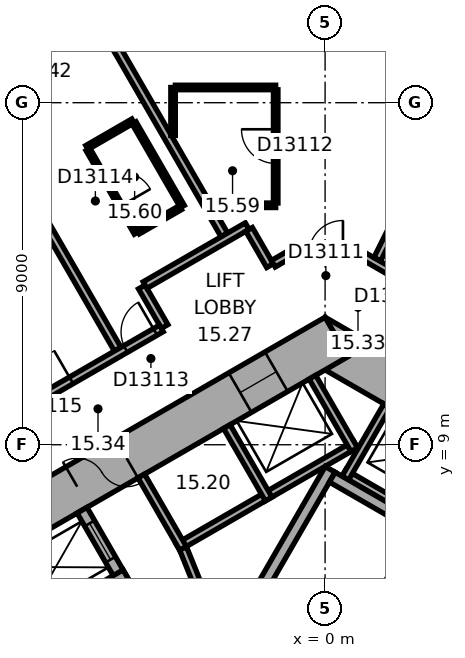
"""IFC4 building model, lengths in metres.
Left out: names, types, materials, properties, quantities, classifications, styles, units other than length and angle.
Written with IfcOpenShell. Run it as: python <this file> out.ifc"""

import sys

from ifc_helpers import new_model, si_unit, direction, frame, frame_2d, origin, place, context, subcontext, project, spatial, rectangle, extrude, element, fill, save


model = new_model("IFC4")
c1 = context("Model", 3, precision=1e-05, world=origin(), true_north=direction((0.0, 1.0)))
c2 = subcontext(c1, "Body", "Model", "MODEL_VIEW")
j1 = project(units=[si_unit("LENGTHUNIT", "METRE"), si_unit("PLANEANGLEUNIT", "RADIAN")], contexts=[c1])
p1 = place(None, origin())
s1 = spatial("IfcSite", under=j1, at=p1, CompositionType="ELEMENT")
p2 = place(p1, origin())
s2 = spatial("IfcBuilding", under=s1, at=p2, CompositionType="ELEMENT")
p3 = place(p2, frame((0.0, 0.0, 70.4)))
s3 = spatial("IfcBuildingStorey", under=s2, at=p3, CompositionType="ELEMENT", Elevation=70.4)
p4 = place(p3, frame((10.4, 5.658, 0.0), z_axis=(0.0, 0.0, 1.0), x_axis=(-0.866021384402, 0.500006961711, 0.0)))
e1 = element("IfcWall", 1, at=p4, inside=s3, PredefinedType="SHEAR", context=c2, shape_type="SweptSolid", body=[
    extrude(rectangle(XDim=12.355, YDim=1.2, at=frame_2d((6.178, 0.0))), origin(), (0.0, 0.0, 1.0), 3.3),
])
p5 = place(p4, frame((2.728, 0.0, 0.0)))
e2 = element("IfcOpeningElement", 2, at=p5, cuts=e1, PredefinedType="OPENING", context=c2, shape_type="SweptSolid", body=[
    extrude(rectangle(XDim=1.1, YDim=2.1, at=frame_2d((0.55, 1.05))), frame((0.0, 0.61, 0.0), z_axis=(0.0, -1.0, 0.0), x_axis=(1.0, 0.0, 0.0)), (0.0, 0.0, 1.0), 1.22),
])
p6 = place(p4, frame((5.328, 0.0, 0.0)))
e3 = element("IfcOpeningElement", 3, at=p6, cuts=e1, PredefinedType="OPENING", context=c2, shape_type="SweptSolid", body=[
    extrude(rectangle(XDim=1.1, YDim=2.1, at=frame_2d((0.55, 1.05))), frame((0.0, 0.61, 0.0), z_axis=(0.0, -1.0, 0.0), x_axis=(1.0, 0.0, 0.0)), (0.0, 0.0, 1.0), 1.22),
])
p7 = place(p4, frame((7.928, 0.0, 0.0)))
e4 = element("IfcOpeningElement", 4, at=p7, cuts=e1, PredefinedType="OPENING", context=c2, shape_type="SweptSolid", body=[
    extrude(rectangle(XDim=1.1, YDim=2.1, at=frame_2d((0.55, 1.05))), frame((0.0, 0.61, 0.0), z_axis=(0.0, -1.0, 0.0), x_axis=(1.0, 0.0, 0.0)), (0.0, 0.0, 1.0), 1.22),
])
p8 = place(p3, frame((0.3, 11.836, 0.0), z_axis=(0.0, 0.0, 1.0), x_axis=(-0.866021384402, -0.500006961711, 0.0)))
e5 = element("IfcWall", 5, at=p8, inside=s3, PredefinedType="SHEAR", context=c2, shape_type="SweptSolid", body=[
    extrude(rectangle(XDim=12.355, YDim=1.2, at=frame_2d((6.178, 0.0))), origin(), (0.0, 0.0, 1.0), 3.3),
])
p9 = place(p8, frame((6.378, 0.0, 0.0)))
e6 = element("IfcOpeningElement", 6, at=p9, cuts=e5, PredefinedType="OPENING", context=c2, shape_type="SweptSolid", body=[
    extrude(rectangle(XDim=1.5, YDim=2.1, at=frame_2d((0.75, 1.05))), frame((0.0, 0.61, 0.0), z_axis=(0.0, -1.0, 0.0), x_axis=(1.0, 0.0, 0.0)), (0.0, 0.0, 1.0), 1.22),
])
p10 = place(p8, frame((1.828, 0.0, 0.0)))
e7 = element("IfcOpeningElement", 7, at=p10, cuts=e5, PredefinedType="OPENING", context=c2, shape_type="SweptSolid", body=[
    extrude(rectangle(XDim=1.1, YDim=2.1, at=frame_2d((0.55, 1.05))), frame((0.0, 0.61, 0.0), z_axis=(0.0, -1.0, 0.0), x_axis=(1.0, 0.0, 0.0)), (0.0, 0.0, 1.0), 1.22),
])
p11 = place(p3, frame((20.63, 15.47, 0.0), z_axis=(0.0, 0.0, 1.0), x_axis=(-0.894934518609, 0.446197498203, 0.0)))
e8 = element("IfcWall", 8, at=p11, inside=s3, PredefinedType="STANDARD", context=c2, shape_type="SweptSolid", body=[
    extrude(rectangle(XDim=21.246, YDim=0.2, at=frame_2d((10.623, 0.0))), origin(), (0.0, 0.0, 1.0), 3.3),
])
p12 = place(p11, frame((1.553, 0.0, 0.8)))
e9 = element("IfcOpeningElement", 9, at=p12, cuts=e8, PredefinedType="OPENING", context=c2, shape_type="SweptSolid", body=[
    extrude(rectangle(XDim=2.4, YDim=1.7, at=frame_2d((1.2, 0.85))), frame((0.0, 0.11, 0.0), z_axis=(0.0, -1.0, 0.0), x_axis=(1.0, 0.0, 0.0)), (0.0, 0.0, 1.0), 0.22),
])
p13 = place(p11, frame((5.488, 0.0, 0.8)))
e10 = element("IfcOpeningElement", 10, at=p13, cuts=e8, PredefinedType="OPENING", context=c2, shape_type="SweptSolid", body=[
    extrude(rectangle(XDim=2.4, YDim=1.7, at=frame_2d((1.2, 0.85))), frame((0.0, 0.11, 0.0), z_axis=(0.0, -1.0, 0.0), x_axis=(1.0, 0.0, 0.0)), (0.0, 0.0, 1.0), 0.22),
])
p14 = place(p11, frame((9.422, 0.0, 0.8)))
e11 = element("IfcOpeningElement", 11, at=p14, cuts=e8, PredefinedType="OPENING", context=c2, shape_type="SweptSolid", body=[
    extrude(rectangle(XDim=2.4, YDim=1.7, at=frame_2d((1.2, 0.85))), frame((0.0, 0.11, 0.0), z_axis=(0.0, -1.0, 0.0), x_axis=(1.0, 0.0, 0.0)), (0.0, 0.0, 1.0), 0.22),
])
p15 = place(p11, frame((13.357, 0.0, 0.8)))
e12 = element("IfcOpeningElement", 12, at=p15, cuts=e8, PredefinedType="OPENING", context=c2, shape_type="SweptSolid", body=[
    extrude(rectangle(XDim=2.4, YDim=1.7, at=frame_2d((1.2, 0.85))), frame((0.0, 0.11, 0.0), z_axis=(0.0, -1.0, 0.0), x_axis=(1.0, 0.0, 0.0)), (0.0, 0.0, 1.0), 0.22),
])
p16 = place(p11, frame((17.292, 0.0, 0.8)))
e13 = element("IfcOpeningElement", 13, at=p16, cuts=e8, PredefinedType="OPENING", context=c2, shape_type="SweptSolid", body=[
    extrude(rectangle(XDim=2.4, YDim=1.7, at=frame_2d((1.2, 0.85))), frame((0.0, 0.11, 0.0), z_axis=(0.0, -1.0, 0.0), x_axis=(1.0, 0.0, 0.0)), (0.0, 0.0, 1.0), 0.22),
])
p17 = place(p3, frame((-3.136, 24.805, 0.0), z_axis=(0.0, 0.0, 1.0), x_axis=(-0.866028291626, -0.499994998079, 0.0)))
e14 = element("IfcWall", 14, at=p17, inside=s3, PredefinedType="STANDARD", context=c2, shape_type="SweptSolid", body=[
    extrude(rectangle(XDim=21.246, YDim=0.2, at=frame_2d((10.623, 0.0))), origin(), (0.0, 0.0, 1.0), 3.3),
])
p18 = place(p17, frame((1.555, 0.0, 0.8)))
e15 = element("IfcOpeningElement", 15, at=p18, cuts=e14, PredefinedType="OPENING", context=c2, shape_type="SweptSolid", body=[
    extrude(rectangle(XDim=2.4, YDim=1.7, at=frame_2d((1.2, 0.85))), frame((0.0, 0.11, 0.0), z_axis=(0.0, -1.0, 0.0), x_axis=(1.0, 0.0, 0.0)), (0.0, 0.0, 1.0), 0.22),
])
p19 = place(p17, frame((5.489, 0.0, 0.8)))
e16 = element("IfcOpeningElement", 16, at=p19, cuts=e14, PredefinedType="OPENING", context=c2, shape_type="SweptSolid", body=[
    extrude(rectangle(XDim=2.4, YDim=1.7, at=frame_2d((1.2, 0.85))), frame((0.0, 0.11, 0.0), z_axis=(0.0, -1.0, 0.0), x_axis=(1.0, 0.0, 0.0)), (0.0, 0.0, 1.0), 0.22),
])
p20 = place(p17, frame((9.424, 0.0, 0.8)))
e17 = element("IfcOpeningElement", 17, at=p20, cuts=e14, PredefinedType="OPENING", context=c2, shape_type="SweptSolid", body=[
    extrude(rectangle(XDim=2.4, YDim=1.7, at=frame_2d((1.2, 0.85))), frame((0.0, 0.11, 0.0), z_axis=(0.0, -1.0, 0.0), x_axis=(1.0, 0.0, 0.0)), (0.0, 0.0, 1.0), 0.22),
])
p21 = place(p17, frame((13.358, 0.0, 0.8)))
e18 = element("IfcOpeningElement", 18, at=p21, cuts=e14, PredefinedType="OPENING", context=c2, shape_type="SweptSolid", body=[
    extrude(rectangle(XDim=2.4, YDim=1.7, at=frame_2d((1.2, 0.85))), frame((0.0, 0.11, 0.0), z_axis=(0.0, -1.0, 0.0), x_axis=(1.0, 0.0, 0.0)), (0.0, 0.0, 1.0), 0.22),
])
p22 = place(p17, frame((17.293, 0.0, 0.8)))
e19 = element("IfcOpeningElement", 19, at=p22, cuts=e14, PredefinedType="OPENING", context=c2, shape_type="SweptSolid", body=[
    extrude(rectangle(XDim=2.4, YDim=1.7, at=frame_2d((1.2, 0.85))), frame((0.0, 0.11, 0.0), z_axis=(0.0, -1.0, 0.0), x_axis=(1.0, 0.0, 0.0)), (0.0, 0.0, 1.0), 0.22),
])
p23 = place(p3, frame((7.424, 4.259, 0.0), z_axis=(0.0, 0.0, 1.0), x_axis=(-0.866026010844, 0.49999894854, 0.0)))
e20 = element("IfcWall", 20, at=p23, inside=s3, PredefinedType="PARTITIONING", context=c2, shape_type="SweptSolid", body=[
    extrude(rectangle(XDim=8.0, YDim=0.2, at=frame_2d((4.0, 0.0))), origin(), (0.0, 0.0, 1.0), 3.05),
])
p24 = place(p3, frame((0.532, 8.122, 0.0), z_axis=(0.0, 0.0, 1.0), x_axis=(0.500077893725, 0.86598042715, 0.0)))
e21 = element("IfcWall", 21, at=p24, inside=s3, PredefinedType="PARTITIONING", context=c2, shape_type="SweptSolid", body=[
    extrude(rectangle(XDim=2.2, YDim=0.2, at=frame_2d((1.1, 0.0))), origin(), (0.0, 0.0, 1.0), 3.05),
])
p25 = place(p3, frame((0.803, 9.009, 0.0), z_axis=(0.0, 0.0, 1.0), x_axis=(-0.866028230842, -0.499995103361, 0.0)))
e22 = element("IfcWall", 22, at=p25, inside=s3, PredefinedType="PARTITIONING", context=c2, shape_type="SweptSolid", body=[
    extrude(rectangle(XDim=5.4, YDim=0.2, at=frame_2d((2.7, 0.0))), origin(), (0.0, 0.0, 1.0), 3.05),
])
p26 = place(p3, frame((0.767, 8.872, 0.0), z_axis=(0.0, 0.0, 1.0), x_axis=(-0.499994660107, 0.866028486751, 0.0)))
e23 = element("IfcWall", 23, at=p26, inside=s3, PredefinedType="PARTITIONING", context=c2, shape_type="SweptSolid", body=[
    extrude(rectangle(XDim=2.2, YDim=0.2, at=frame_2d((1.1, 0.0))), origin(), (0.0, 0.0, 1.0), 3.05),
])
for number, where, z_axis, x_axis in (
    (24, (-1.485, 7.572, 0.0), (0.0, 0.0, 1.0), (-0.5, 0.866, 0.0)),
    (25, (-3.737, 6.272, 0.0), (0.0, 0.0, 1.0), (-0.5, 0.866, 0.0)),
):
    element("IfcWall", number, at=place(p3, frame(where, z_axis=z_axis, x_axis=x_axis)), inside=s3, PredefinedType="PARTITIONING", context=c2, shape_type="SweptSolid", body=[
        extrude(rectangle(XDim=2.2, YDim=0.2, at=frame_2d((1.1, 0.0))), origin(), (0.0, 0.0, 1.0), 3.05),
    ])
p27 = place(p3, frame((-2.216, 4.282, 0.0), z_axis=(0.0, 0.0, 1.0), x_axis=(0.499977259774, 0.866038532462, 0.0)))
e26 = element("IfcWall", 26, at=p27, inside=s3, PredefinedType="SHEAR", context=c2, shape_type="SweptSolid", body=[
    extrude(rectangle(XDim=4.7, YDim=0.3, at=frame_2d((2.35, 0.0))), origin(), (0.0, 0.0, 1.0), 3.05),
])
p28 = place(p3, frame((6.303, 4.617, 0.0), z_axis=(0.0, 0.0, 1.0), x_axis=(-0.866027801685, 0.499995846692, 0.0)))
e27 = element("IfcWall", 27, at=p28, inside=s3, PredefinedType="SHEAR", context=c2, shape_type="SweptSolid", body=[
    extrude(rectangle(XDim=7.06, YDim=0.3, at=frame_2d((3.53, 0.0))), origin(), (0.0, 0.0, 1.0), 3.05),
])
p29 = place(p3, frame((-5.295, 5.372, 0.0), z_axis=(0.0, 0.0, 1.0), x_axis=(-0.500077893725, 0.86598042715, 0.0)))
e28 = element("IfcWall", 28, at=p29, inside=s3, PredefinedType="SHEAR", context=c2, shape_type="SweptSolid", body=[
    extrude(rectangle(XDim=2.2, YDim=0.3, at=frame_2d((1.1, 0.0))), origin(), (0.0, 0.0, 1.0), 3.05),
])
p30 = place(p29, frame((0.7, 0.0, 0.0)))
e29 = element("IfcOpeningElement", 29, at=p30, cuts=e28, PredefinedType="OPENING", context=c2, shape_type="SweptSolid", body=[
    extrude(rectangle(XDim=1.1, YDim=2.1, at=frame_2d((0.55, 1.05))), frame((0.0, 0.16, 0.0), z_axis=(0.0, -1.0, 0.0), x_axis=(1.0, 0.0, 0.0)), (0.0, 0.0, 1.0), 0.32),
])
p31 = place(p3, frame((-5.24, 5.577, 0.0), z_axis=(0.0, 0.0, 1.0), x_axis=(-0.866014461049, -0.500018952895, 0.0)))
e30 = element("IfcWall", 30, at=p31, inside=s3, PredefinedType="SHEAR", context=c2, shape_type="SweptSolid", body=[
    extrude(rectangle(XDim=3.35, YDim=0.3, at=frame_2d((1.675, 0.0))), origin(), (0.0, 0.0, 1.0), 3.05),
])
p32 = place(p3, frame((-2.615, 3.487, 0.0), z_axis=(0.0, 0.0, 1.0), x_axis=(-0.373576831041, 0.92759924068, 0.0)))
e31 = element("IfcWall", 31, at=p32, inside=s3, PredefinedType="PARTITIONING", context=c2, shape_type="SweptSolid", body=[
    extrude(rectangle(XDim=3.002, YDim=0.2, at=frame_2d((1.501, 0.0))), origin(), (0.0, 0.0, 1.0), 3.05),
])
p33 = place(p32, frame((1.15, 0.0, 0.0)))
e32 = element("IfcOpeningElement", 32, at=p33, cuts=e31, PredefinedType="OPENING", context=c2, shape_type="SweptSolid", body=[
    extrude(rectangle(XDim=0.9, YDim=2.1, at=frame_2d((0.45, 1.05))), frame((0.0, 0.11, 0.0), z_axis=(0.0, -1.0, 0.0), x_axis=(1.0, 0.0, 0.0)), (0.0, 0.0, 1.0), 0.22),
])
p34 = place(p3, frame((-10.083, 19.524, 0.0), z_axis=(0.0, 0.0, 1.0), x_axis=(0.499999662836, -0.866025598446, 0.0)))
e33 = element("IfcWall", 33, at=p34, inside=s3, PredefinedType="PARTITIONING", context=c2, shape_type="SweptSolid", body=[
    extrude(rectangle(XDim=9.25, YDim=0.2, at=frame_2d((4.625, 0.0))), origin(), (0.0, 0.0, 1.0), 2.6),
])
p35 = place(p3, frame((-6.676, 21.492, 0.0), z_axis=(0.0, 0.0, 1.0), x_axis=(0.500011263043, -0.866018900966, 0.0)))
e34 = element("IfcWall", 34, at=p35, inside=s3, PredefinedType="PARTITIONING", context=c2, shape_type="SweptSolid", body=[
    extrude(rectangle(XDim=8.049, YDim=0.2, at=frame_2d((4.024, 0.0))), origin(), (0.0, 0.0, 1.0), 3.05),
])
p36 = place(p3, frame((-6.268, 16.82, 0.0), z_axis=(0.0, 0.0, 1.0), x_axis=(0.866002662425, 0.500039387122, 0.0)))
e35 = element("IfcWall", 35, at=p36, inside=s3, PredefinedType="PARTITIONING", context=c2, shape_type="SweptSolid", body=[
    extrude(rectangle(XDim=1.4, YDim=0.12, at=frame_2d((0.7, 0.0))), origin(), (0.0, 0.0, 1.0), 3.05),
])
p37 = place(p3, frame((-5.026, 17.469, 0.0), z_axis=(0.0, 0.0, 1.0), x_axis=(0.500005339912, -0.866022320763, 0.0)))
e36 = element("IfcWall", 36, at=p37, inside=s3, PredefinedType="PARTITIONING", context=c2, shape_type="SweptSolid", body=[
    extrude(rectangle(XDim=2.54, YDim=0.12, at=frame_2d((1.27, 0.0))), origin(), (0.0, 0.0, 1.0), 3.05),
])
p38 = place(p3, frame((-4.968, 14.569, 0.0), z_axis=(0.0, 0.0, 1.0), x_axis=(-0.500046963369, 0.865998287773, 0.0)))
e37 = element("IfcWall", 37, at=p38, inside=s3, PredefinedType="PARTITIONING", context=c2, shape_type="SweptSolid", body=[
    extrude(rectangle(XDim=2.54, YDim=0.12, at=frame_2d((1.27, 0.0))), origin(), (0.0, 0.0, 1.0), 3.05),
])
p39 = place(p38, frame((0.82, 0.0, 0.0)))
e38 = element("IfcOpeningElement", 38, at=p39, cuts=e37, PredefinedType="OPENING", context=c2, shape_type="SweptSolid", body=[
    extrude(rectangle(XDim=0.9, YDim=2.1, at=frame_2d((0.45, 1.05))), frame((0.0, 0.07, 0.0), z_axis=(0.0, -1.0, 0.0), x_axis=(1.0, 0.0, 0.0)), (0.0, 0.0, 1.0), 0.14),
])
p40 = place(p3, frame((-4.823, 13.152, 0.0), z_axis=(0.0, 0.0, 1.0), x_axis=(0.499986357472, -0.866033280158, 0.0)))
e39 = element("IfcWall", 39, at=p40, inside=s3, PredefinedType="PARTITIONING", context=c2, shape_type="SweptSolid", body=[
    extrude(rectangle(XDim=1.201, YDim=0.2, at=frame_2d((0.601, 0.0))), origin(), (0.0, 0.0, 1.0), 3.05),
])
p41 = place(p3, frame((-4.309, 12.061, 0.0), z_axis=(0.0, 0.0, 1.0), x_axis=(-0.866020679205, -0.500008183122, 0.0)))
e40 = element("IfcWall", 40, at=p41, inside=s3, PredefinedType="PARTITIONING", context=c2, shape_type="SweptSolid", body=[
    extrude(rectangle(XDim=5.104, YDim=0.2, at=frame_2d((2.552, 0.0))), origin(), (0.0, 0.0, 1.0), 3.05),
])
p42 = place(p41, frame((0.185, 0.0, 0.0)))
e41 = element("IfcOpeningElement", 41, at=p42, cuts=e40, PredefinedType="OPENING", context=c2, shape_type="SweptSolid", body=[
    extrude(rectangle(XDim=0.9, YDim=2.1, at=frame_2d((0.45, 1.05))), frame((0.0, 0.11, 0.0), z_axis=(0.0, -1.0, 0.0), x_axis=(1.0, 0.0, 0.0)), (0.0, 0.0, 1.0), 0.22),
])
p43 = place(p41, frame((2.736, 0.0, 0.0)))
e42 = element("IfcOpeningElement", 42, at=p43, cuts=e40, PredefinedType="OPENING", context=c2, shape_type="SweptSolid", body=[
    extrude(rectangle(XDim=0.9, YDim=2.1, at=frame_2d((0.45, 1.05))), frame((0.0, 0.11, 0.0), z_axis=(0.0, -1.0, 0.0), x_axis=(1.0, 0.0, 0.0)), (0.0, 0.0, 1.0), 0.22),
])
p44 = place(p3, frame((-4.0, 17.137, 0.0), z_axis=(0.0, 0.0, 1.0), x_axis=(0.0, 1.0, 0.0)))
e43 = element("IfcWall", 43, at=p44, inside=s3, PredefinedType="PARTITIONING", context=c2, shape_type="SweptSolid", body=[
    extrude(rectangle(XDim=1.263, YDim=0.12, at=frame_2d((0.632, 0.0))), origin(), (0.0, 0.0, 1.0), 3.05),
])
p45 = place(p3, frame((-3.94, 18.401, 0.0), z_axis=(0.0, 0.0, 1.0), x_axis=(1.0, 0.0, 0.0)))
e44 = element("IfcWall", 44, at=p45, inside=s3, PredefinedType="PARTITIONING", context=c2, shape_type="SweptSolid", body=[
    extrude(rectangle(XDim=2.64, YDim=0.12, at=frame_2d((1.32, 0.0))), origin(), (0.0, 0.0, 1.0), 3.05),
])
p46 = place(p3, frame((-3.808, 15.239, 0.0), z_axis=(0.0, 0.0, 1.0), x_axis=(-0.866087136806, -0.499893060024, 0.0)))
e45 = element("IfcWall", 45, at=p46, inside=s3, PredefinedType="PARTITIONING", context=c2, shape_type="SweptSolid", body=[
    extrude(rectangle(XDim=1.28, YDim=0.12, at=frame_2d((0.64, 0.0))), origin(), (0.0, 0.0, 1.0), 3.05),
])
p47 = place(p3, frame((-2.05, 14.752, 0.0), z_axis=(0.0, 0.0, 1.0), x_axis=(-0.866030936828, -0.499990416364, 0.0)))
e46 = element("IfcWall", 46, at=p47, inside=s3, PredefinedType="PARTITIONING", context=c2, shape_type="SweptSolid", body=[
    extrude(rectangle(XDim=3.102, YDim=0.2, at=frame_2d((1.551, 0.0))), origin(), (0.0, 0.0, 1.0), 3.05),
])
p48 = place(p3, frame((-1.449, 13.712, 0.0), z_axis=(0.0, 0.0, 1.0), x_axis=(-0.499978356969, 0.866037899034, 0.0)))
e47 = element("IfcWall", 47, at=p48, inside=s3, PredefinedType="PARTITIONING", context=c2, shape_type="SweptSolid", body=[
    extrude(rectangle(XDim=1.101, YDim=0.2, at=frame_2d((0.551, 0.0))), origin(), (0.0, 0.0, 1.0), 3.05),
])
p49 = place(p3, frame((-1.3, 15.301, 0.0), z_axis=(0.0, 0.0, 1.0), x_axis=(-1.0, 0.0, 0.0)))
e48 = element("IfcWall", 48, at=p49, inside=s3, PredefinedType="PARTITIONING", context=c2, shape_type="SweptSolid", body=[
    extrude(rectangle(XDim=1.661, YDim=0.12, at=frame_2d((0.831, 0.0))), origin(), (0.0, 0.0, 1.0), 3.05),
])
p50 = place(p3, frame((-1.3, 18.341, 0.0), z_axis=(0.0, 0.0, 1.0), x_axis=(0.0, -1.0, 0.0)))
e49 = element("IfcWall", 49, at=p50, inside=s3, PredefinedType="PARTITIONING", context=c2, shape_type="SweptSolid", body=[
    extrude(rectangle(XDim=2.98, YDim=0.12, at=frame_2d((1.49, 0.0))), origin(), (0.0, 0.0, 1.0), 3.05),
])
p51 = place(p50, frame((1.04, 0.0, 0.0)))
e50 = element("IfcOpeningElement", 50, at=p51, cuts=e49, PredefinedType="OPENING", context=c2, shape_type="SweptSolid", body=[
    extrude(rectangle(XDim=0.9, YDim=2.1, at=frame_2d((0.45, 1.05))), frame((0.0, 0.07, 0.0), z_axis=(0.0, -1.0, 0.0), x_axis=(1.0, 0.0, 0.0)), (0.0, 0.0, 1.0), 0.14),
])
p52 = place(p3, frame((-0.95, 14.001, 0.0), z_axis=(0.0, 0.0, 1.0), x_axis=(-0.86609177584, -0.499885022602, 0.0)))
e51 = element("IfcWall", 51, at=p52, inside=s3, PredefinedType="PARTITIONING", context=c2, shape_type="SweptSolid", body=[
    extrude(rectangle(XDim=0.477, YDim=0.2, at=frame_2d((0.238, 0.0))), origin(), (0.0, 0.0, 1.0), 3.05),
])
p53 = place(p3, frame((0.95, 14.001, 0.0), z_axis=(0.0, 0.0, 1.0), x_axis=(-1.0, 0.0, 0.0)))
e52 = element("IfcWall", 52, at=p53, inside=s3, PredefinedType="PARTITIONING", context=c2, shape_type="SweptSolid", body=[
    extrude(rectangle(XDim=1.86, YDim=0.2, at=frame_2d((0.93, 0.0))), origin(), (0.0, 0.0, 1.0), 3.05),
])
p54 = place(p53, frame((0.48, 0.0, 0.0)))
e53 = element("IfcOpeningElement", 53, at=p54, cuts=e52, PredefinedType="OPENING", context=c2, shape_type="SweptSolid", body=[
    extrude(rectangle(XDim=0.9, YDim=2.1, at=frame_2d((0.45, 1.05))), frame((0.0, 0.11, 0.0), z_axis=(0.0, -1.0, 0.0), x_axis=(1.0, 0.0, 0.0)), (0.0, 0.0, 1.0), 0.22),
])
p55 = place(p3, frame((2.748, 12.962, 0.0), z_axis=(0.0, 0.0, 1.0), x_axis=(-0.866013897511, 0.50001992892, 0.0)))
e54 = element("IfcWall", 54, at=p55, inside=s3, PredefinedType="PARTITIONING", context=c2, shape_type="SweptSolid", body=[
    extrude(rectangle(XDim=2.037, YDim=0.2, at=frame_2d((1.018, 0.0))), origin(), (0.0, 0.0, 1.0), 3.05),
])
p56 = place(p55, frame((0.372, 0.0, 0.0)))
e55 = element("IfcOpeningElement", 55, at=p56, cuts=e54, PredefinedType="OPENING", context=c2, shape_type="SweptSolid", body=[
    extrude(rectangle(XDim=0.9, YDim=2.1, at=frame_2d((0.45, 1.05))), frame((0.0, 0.11, 0.0), z_axis=(0.0, -1.0, 0.0), x_axis=(1.0, 0.0, 0.0)), (0.0, 0.0, 1.0), 0.22),
])
p57 = place(p3, frame((5.351, 21.859, 0.0), z_axis=(0.0, 0.0, 1.0), x_axis=(-0.446205309328, -0.894930624086, 0.0)))
e56 = element("IfcWall", 56, at=p57, inside=s3, PredefinedType="PARTITIONING", context=c2, shape_type="SweptSolid", body=[
    extrude(rectangle(XDim=8.913, YDim=0.2, at=frame_2d((4.457, 0.0))), origin(), (0.0, 0.0, 1.0), 2.6),
])
p58 = place(p9, origin())
e57 = element("IfcDoor", 57, at=p58, inside=s3, OperationType="DOUBLE_DOOR_SINGLE_SWING", PredefinedType="DOOR", context=c2, shape_type="SweptSolid", body=[
    extrude(rectangle(XDim=1.5, YDim=2.1, at=frame_2d((0.75, 1.05))), frame((0.0, 0.025, 0.0), z_axis=(0.0, -1.0, 0.0), x_axis=(1.0, 0.0, 0.0)), (0.0, 0.0, 1.0), 0.05),
])
fill(e6, e57)
p59 = place(p30, origin())
e58 = element("IfcDoor", 58, at=p59, inside=s3, OperationType="DOUBLE_DOOR_SLIDING", PredefinedType="DOOR", context=c2, shape_type="SweptSolid", body=[
    extrude(rectangle(XDim=1.1, YDim=2.1, at=frame_2d((0.55, 1.05))), frame((0.0, 0.025, 0.0), z_axis=(0.0, -1.0, 0.0), x_axis=(1.0, 0.0, 0.0)), (0.0, 0.0, 1.0), 0.05),
])
fill(e29, e58)
p60 = place(p10, origin())
e59 = element("IfcDoor", 59, at=p60, inside=s3, OperationType="DOUBLE_DOOR_SLIDING", PredefinedType="DOOR", context=c2, shape_type="SweptSolid", body=[
    extrude(rectangle(XDim=1.1, YDim=2.1, at=frame_2d((0.55, 1.05))), frame((0.0, 0.025, 0.0), z_axis=(0.0, -1.0, 0.0), x_axis=(1.0, 0.0, 0.0)), (0.0, 0.0, 1.0), 0.05),
])
fill(e7, e59)
p61 = place(p54, origin())
e60 = element("IfcDoor", 60, at=p61, inside=s3, OperationType="SINGLE_SWING_LEFT", PredefinedType="DOOR", context=c2, shape_type="SweptSolid", body=[
    extrude(rectangle(XDim=0.9, YDim=2.1, at=frame_2d((0.45, 1.05))), frame((0.0, 0.025, 0.0), z_axis=(0.0, -1.0, 0.0), x_axis=(1.0, 0.0, 0.0)), (0.0, 0.0, 1.0), 0.05),
])
fill(e53, e60)
p62 = place(p51, origin())
e61 = element("IfcDoor", 61, at=p62, inside=s3, OperationType="SINGLE_SWING_LEFT", PredefinedType="DOOR", context=c2, shape_type="SweptSolid", body=[
    extrude(rectangle(XDim=0.9, YDim=2.1, at=frame_2d((0.45, 1.05))), frame((0.0, 0.025, 0.0), z_axis=(0.0, -1.0, 0.0), x_axis=(1.0, 0.0, 0.0)), (0.0, 0.0, 1.0), 0.05),
])
fill(e50, e61)
p63 = place(p42, origin())
e62 = element("IfcDoor", 62, at=p63, inside=s3, OperationType="SINGLE_SWING_LEFT", PredefinedType="DOOR", context=c2, shape_type="SweptSolid", body=[
    extrude(rectangle(XDim=0.9, YDim=2.1, at=frame_2d((0.45, 1.05))), frame((0.0, 0.025, 0.0), z_axis=(0.0, -1.0, 0.0), x_axis=(1.0, 0.0, 0.0)), (0.0, 0.0, 1.0), 0.05),
])
fill(e41, e62)
p64 = place(p39, origin())
e63 = element("IfcDoor", 63, at=p64, inside=s3, OperationType="SINGLE_SWING_LEFT", PredefinedType="DOOR", context=c2, shape_type="SweptSolid", body=[
    extrude(rectangle(XDim=0.9, YDim=2.1, at=frame_2d((0.45, 1.05))), frame((0.0, 0.025, 0.0), z_axis=(0.0, -1.0, 0.0), x_axis=(1.0, 0.0, 0.0)), (0.0, 0.0, 1.0), 0.05),
])
fill(e38, e63)
p65 = place(p43, origin())
e64 = element("IfcDoor", 64, at=p65, inside=s3, OperationType="SINGLE_SWING_LEFT", PredefinedType="DOOR", context=c2, shape_type="SweptSolid", body=[
    extrude(rectangle(XDim=0.9, YDim=2.1, at=frame_2d((0.45, 1.05))), frame((0.0, 0.025, 0.0), z_axis=(0.0, -1.0, 0.0), x_axis=(1.0, 0.0, 0.0)), (0.0, 0.0, 1.0), 0.05),
])
fill(e42, e64)
save(model, sys.argv[1])
